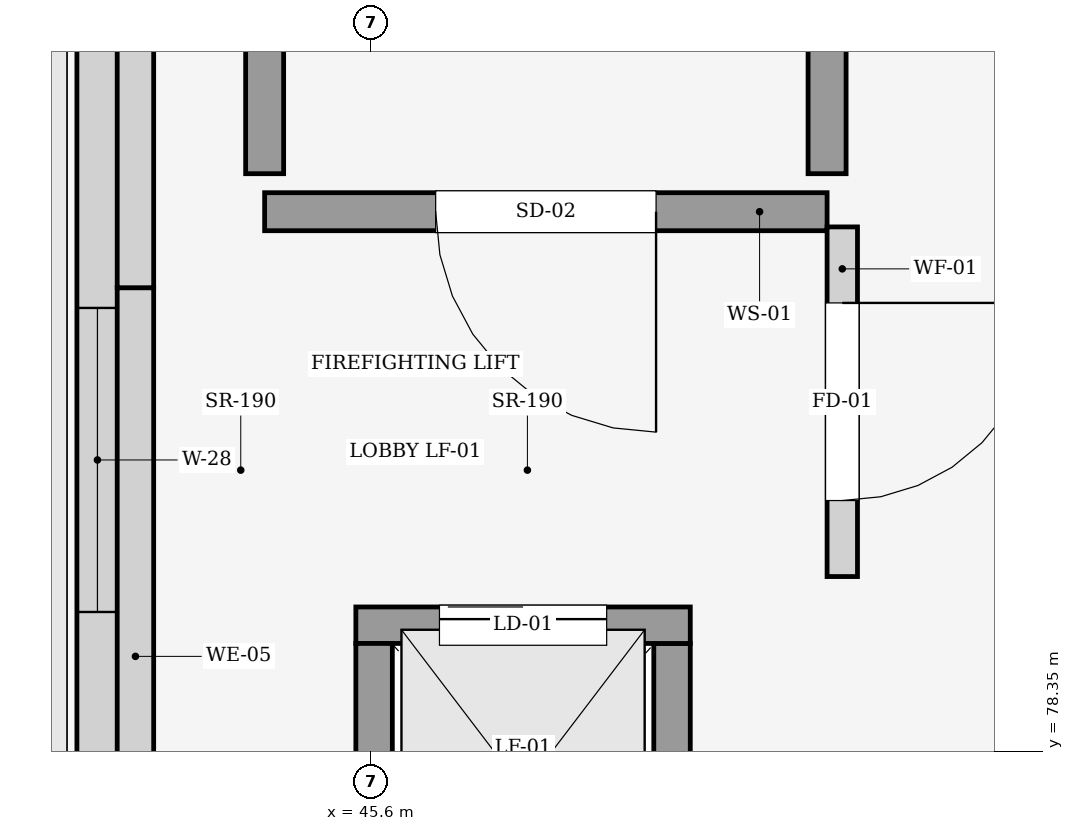
"""IFC4 building model, lengths in metres.
Left out: names, types, materials, properties, quantities, classifications, styles, units other than length and angle.
Written with IfcOpenShell. Run it as: python <this file> out.ifc"""

import sys

from ifc_helpers import new_model, si_unit, direction, frame, frame_2d, origin, place, context, subcontext, project, spatial, rectangle, extrude, element, fill, save


model = new_model("IFC4")
c1 = context("Model", 3, precision=1e-05, world=origin(), true_north=direction((0.0, 1.0)))
c2 = subcontext(c1, "Body", "Model", "MODEL_VIEW")
j1 = project(units=[si_unit("LENGTHUNIT", "METRE"), si_unit("PLANEANGLEUNIT", "RADIAN")], contexts=[c1])
p1 = place(None, origin())
s1 = spatial("IfcSite", under=j1, at=p1, CompositionType="ELEMENT")
p2 = place(p1, origin())
s2 = spatial("IfcBuilding", under=s1, at=p2, CompositionType="ELEMENT")
p3 = place(p2, frame((0.0, 0.0, 29.4)))
s3 = spatial("IfcBuildingStorey", under=s2, at=p3, CompositionType="ELEMENT", Elevation=29.4)
p4 = place(p3, frame((43.8, 76.685, 0.0), z_axis=(0.0, 0.0, 1.0), x_axis=(0.0, 1.0, 0.0)))
e1 = element("IfcWall", 1, at=p4, inside=s3, PredefinedType="STANDARD", context=c2, shape_type="SweptSolid", body=[
    extrude(rectangle(XDim=7.165, YDim=0.27, at=frame_2d((3.583, 0.0))), origin(), (0.0, 0.0, 1.0), 4.425),
])
p5 = place(p4, frame((2.582, 0.0, 0.85)))
e2 = element("IfcOpeningElement", 2, at=p5, cuts=e1, PredefinedType="OPENING", context=c2, shape_type="SweptSolid", body=[
    extrude(rectangle(XDim=2.0, YDim=1.85, at=frame_2d((1.0, 0.925))), frame((0.0, 0.145, 0.0), z_axis=(0.0, -1.0, 0.0), x_axis=(1.0, 0.0, 0.0)), (0.0, 0.0, 1.0), 0.29),
])
p6 = place(p3, frame((44.05, 76.55, 4.7), z_axis=(0.0, 0.0, 1.0), x_axis=(0.0, 1.0, 0.0)))
e3 = element("IfcWall", 3, at=p6, inside=s3, PredefinedType="STANDARD", context=c2, shape_type="SweptSolid", body=[
    extrude(rectangle(XDim=4.85, YDim=0.24, at=frame_2d((2.425, 0.0))), origin(), (0.0, 0.0, 1.0), 3.8),
])
p7 = place(p3, frame((44.05, 81.4, 4.7), z_axis=(0.0, 0.0, 1.0), x_axis=(0.0, 1.0, 0.0)))
e4 = element("IfcWall", 4, at=p7, inside=s3, PredefinedType="STANDARD", context=c2, shape_type="SweptSolid", body=[
    extrude(rectangle(XDim=5.2, YDim=0.24, at=frame_2d((2.6, 0.0))), origin(), (0.0, 0.0, 1.0), 4.85),
])
p8 = place(p3, frame((48.6, 81.9, 0.0), z_axis=(0.0, 0.0, 1.0), x_axis=(-1.0, 0.0, 0.0)))
e5 = element("IfcWall", 5, at=p8, inside=s3, PredefinedType="SHEAR", context=c2, shape_type="SweptSolid", body=[
    extrude(rectangle(XDim=3.7, YDim=0.25, at=frame_2d((1.85, 0.0))), origin(), (0.0, 0.0, 1.0), 4.75),
])
p9 = place(p8, frame((1.125, 0.0, 0.0)))
e6 = element("IfcOpeningElement", 6, at=p9, cuts=e5, PredefinedType="OPENING", context=c2, shape_type="SweptSolid", body=[
    extrude(rectangle(XDim=1.45, YDim=2.2, at=frame_2d((0.725, 1.1))), frame((0.0, 0.135, 0.0), z_axis=(0.0, -1.0, 0.0), x_axis=(1.0, 0.0, 0.0)), (0.0, 0.0, 1.0), 0.27),
])
for number, where, z_axis, x_axis in (
    (7, (44.9, 82.15, 0.0), (0.0, 0.0, 1.0), (0.0, 1.0, 0.0)),
    (8, (48.6, 89.85, 0.0), (0.0, 0.0, 1.0), (0.0, -1.0, 0.0)),
):
    element("IfcWall", number, at=place(p3, frame(where, z_axis=z_axis, x_axis=x_axis)), inside=s3, PredefinedType="SHEAR", context=c2, shape_type="SweptSolid", body=[
        extrude(rectangle(XDim=7.7, YDim=0.25, at=frame_2d((3.85, 0.0))), origin(), (0.0, 0.0, 1.0), 4.75),
    ])
p10 = place(p3, frame((47.58, 79.06, 0.0), z_axis=(0.0, 0.0, 1.0), x_axis=(0.0, -1.0, 0.0)))
e9 = element("IfcWall", 9, at=p10, inside=s3, PredefinedType="SHEAR", context=c2, shape_type="SweptSolid", body=[
    extrude(rectangle(XDim=1.92, YDim=0.24, at=frame_2d((0.96, 0.0))), origin(), (0.0, 0.0, 1.0), 4.75),
])
p11 = place(p3, frame((45.5, 79.18, 0.0), z_axis=(0.0, 0.0, 1.0), x_axis=(1.0, 0.0, 0.0)))
e10 = element("IfcWall", 10, at=p11, inside=s3, PredefinedType="SHEAR", context=c2, shape_type="SweptSolid", body=[
    extrude(rectangle(XDim=2.2, YDim=0.24, at=frame_2d((1.1, 0.0))), origin(), (0.0, 0.0, 1.0), 4.75),
])
p12 = place(p11, frame((0.55, 0.0, 0.0)))
e11 = element("IfcOpeningElement", 11, at=p12, cuts=e10, PredefinedType="OPENING", context=c2, shape_type="SweptSolid", body=[
    extrude(rectangle(XDim=1.1, YDim=2.15, at=frame_2d((0.55, 1.075))), frame((0.0, 0.13, 0.0), z_axis=(0.0, -1.0, 0.0), x_axis=(1.0, 0.0, 0.0)), (0.0, 0.0, 1.0), 0.26),
])
p13 = place(p3, frame((45.62, 77.14, 0.0), z_axis=(0.0, 0.0, 1.0), x_axis=(0.0, 1.0, 0.0)))
e12 = element("IfcWall", 12, at=p13, inside=s3, PredefinedType="SHEAR", context=c2, shape_type="SweptSolid", body=[
    extrude(rectangle(XDim=1.92, YDim=0.24, at=frame_2d((0.96, 0.0))), origin(), (0.0, 0.0, 1.0), 4.75),
])
p14 = place(p3, frame((48.7, 81.8, 0.0), z_axis=(0.0, 0.0, 1.0), x_axis=(0.0, -1.0, 0.0)))
e13 = element("IfcWall", 13, at=p14, inside=s3, PredefinedType="PARTITIONING", context=c2, shape_type="SweptSolid", body=[
    extrude(rectangle(XDim=2.3, YDim=0.2, at=frame_2d((1.15, 0.0))), origin(), (0.0, 0.0, 1.0), 2.9),
])
p15 = place(p14, frame((0.5, 0.0, 0.0)))
e14 = element("IfcOpeningElement", 14, at=p15, cuts=e13, PredefinedType="OPENING", context=c2, shape_type="SweptSolid", body=[
    extrude(rectangle(XDim=1.3, YDim=2.2, at=frame_2d((0.65, 1.1))), frame((0.0, 0.11, 0.0), z_axis=(0.0, -1.0, 0.0), x_axis=(1.0, 0.0, 0.0)), (0.0, 0.0, 1.0), 0.22),
])
p16 = place(p5, origin())
e15 = element("IfcWindow", 15, at=p16, inside=s3, PartitioningType="SINGLE_PANEL", PredefinedType="WINDOW", context=c2, shape_type="SweptSolid", body=[
    extrude(rectangle(XDim=2.0, YDim=1.85, at=frame_2d((1.0, 0.925))), frame((0.0, 0.03, 0.0), z_axis=(0.0, -1.0, 0.0), x_axis=(1.0, 0.0, 0.0)), (0.0, 0.0, 1.0), 0.06),
])
fill(e2, e15)
p17 = place(p9, origin())
e16 = element("IfcDoor", 16, at=p17, inside=s3, OperationType="SINGLE_SWING_LEFT", PredefinedType="DOOR", context=c2, shape_type="SweptSolid", body=[
    extrude(rectangle(XDim=1.45, YDim=2.2, at=frame_2d((0.725, 1.1))), frame((0.0, 0.025, 0.0), z_axis=(0.0, -1.0, 0.0), x_axis=(1.0, 0.0, 0.0)), (0.0, 0.0, 1.0), 0.05),
])
fill(e6, e16)
p18 = place(p12, origin())
e17 = element("IfcDoor", 17, at=p18, inside=s3, OperationType="SLIDING_TO_LEFT", PredefinedType="DOOR", context=c2, shape_type="SweptSolid", body=[
    extrude(rectangle(XDim=1.1, YDim=2.15, at=frame_2d((0.55, 1.075))), frame((0.0, 0.025, 0.0), z_axis=(0.0, -1.0, 0.0), x_axis=(1.0, 0.0, 0.0)), (0.0, 0.0, 1.0), 0.05),
])
fill(e11, e17)
p19 = place(p15, origin())
e18 = element("IfcDoor", 18, at=p19, inside=s3, OperationType="SINGLE_SWING_LEFT", PredefinedType="DOOR", context=c2, shape_type="SweptSolid", body=[
    extrude(rectangle(XDim=1.3, YDim=2.2, at=frame_2d((0.65, 1.1))), frame((0.0, 0.025, 0.0), z_axis=(0.0, -1.0, 0.0), x_axis=(1.0, 0.0, 0.0)), (0.0, 0.0, 1.0), 0.05),
])
fill(e14, e18)
save(model, sys.argv[1])
